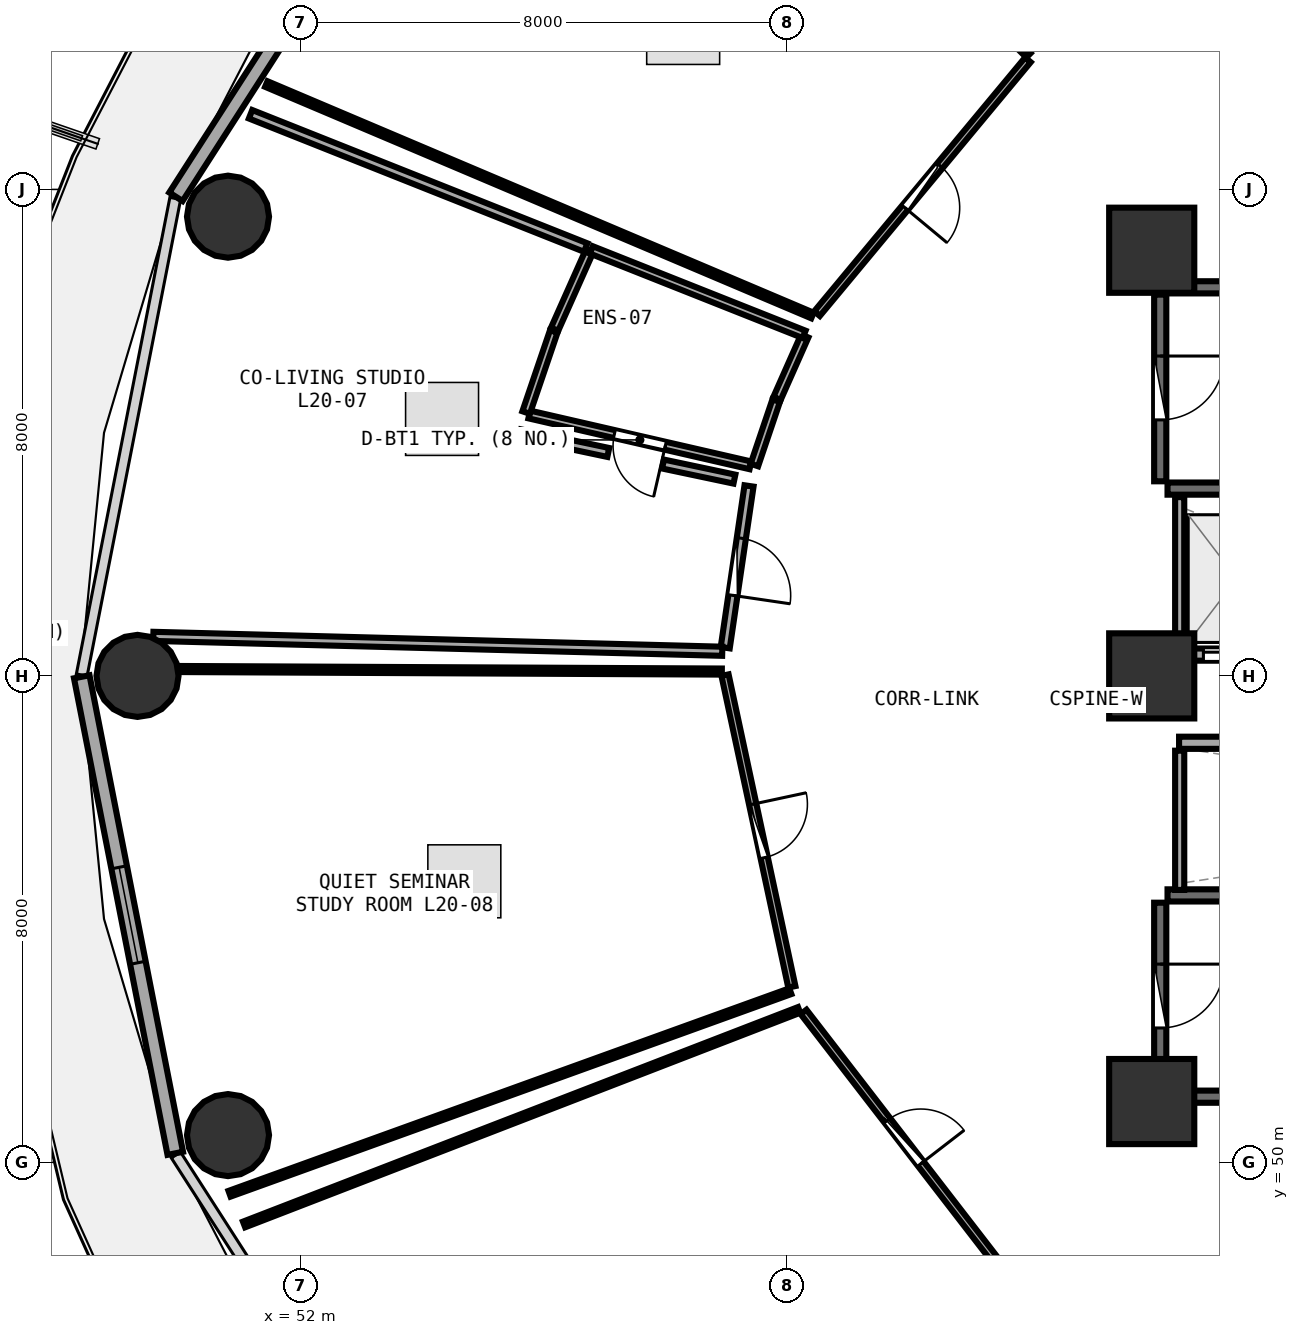
"""IFC4 building model, lengths in metres.
Left out: names, types, materials, properties, quantities, classifications, styles, units other than length and angle.
Written with IfcOpenShell. Run it as: python <this file> out.ifc"""

import sys

from ifc_helpers import new_model, si_unit, direction, frame, frame_2d, origin, origin_2d, place, context, subcontext, project, spatial, rectangle, circle, extrude, element, fill, save


model = new_model("IFC4")
c1 = context("Model", 3, precision=1e-05, world=origin(), true_north=direction((0.0, 1.0)))
c2 = subcontext(c1, "Body", "Model", "MODEL_VIEW")
j1 = project(units=[si_unit("LENGTHUNIT", "METRE"), si_unit("PLANEANGLEUNIT", "RADIAN")], contexts=[c1])
p1 = place(None, origin())
s1 = spatial("IfcSite", under=j1, at=p1, CompositionType="ELEMENT")
p2 = place(p1, origin())
s2 = spatial("IfcBuilding", under=s1, at=p2, CompositionType="ELEMENT")
p3 = place(p2, frame((0.0, 0.0, 80.1)))
s3 = spatial("IfcBuildingStorey", under=s2, at=p3, CompositionType="ELEMENT", Elevation=80.1)
for number, where, z_axis, x_axis in (
    (1, (66.0, 51.0, 0.0), (0.0, 0.0, 1.0), (1.0, 0.0, 0.0)),
    (2, (66.0, 65.0, 0.0), (0.0, 0.0, 1.0), (1.0, 0.0, 0.0)),
    (3, (66.0, 58.0, 0.0), (0.0, 0.0, 1.0), (1.0, 0.0, 0.0)),
):
    element("IfcColumn", number, at=place(p3, frame(where, z_axis=z_axis, x_axis=x_axis)), inside=s3, PredefinedType="PILASTER", context=c2, shape_type="SweptSolid", body=[
        extrude(rectangle(XDim=1.4, YDim=1.4, at=origin_2d()), origin(), (0.0, 0.0, 1.0), 3.75),
    ])
for number, where, z_axis, x_axis in (
    (4, (50.808, 65.552, 0.0), (0.0, 0.0, 1.0), (1.0, 0.0, 0.0)),
    (5, (49.32, 58.0, 0.0), (0.0, 0.0, 1.0), (1.0, 0.0, 0.0)),
    (6, (50.808, 50.448, 0.0), (0.0, 0.0, 1.0), (1.0, 0.0, 0.0)),
):
    element("IfcColumn", number, at=place(p3, frame(where, z_axis=z_axis, x_axis=x_axis)), inside=s3, PredefinedType="COLUMN", context=c2, shape_type="SweptSolid", body=[
        extrude(circle(Radius=0.675, at=origin_2d()), origin(), (0.0, 0.0, 1.0), 3.75),
    ])
p4 = place(p3, frame((54.381, 72.771, 0.0), z_axis=(0.0, 0.0, 1.0), x_axis=(-0.540620528459, -0.841266571432, 0.0)))
e7 = element("IfcWall", 7, at=p4, inside=s3, PredefinedType="SOLIDWALL", context=c2, shape_type="SweptSolid", body=[
    extrude(rectangle(XDim=8.193, YDim=0.26, at=frame_2d((4.096, 0.0))), origin(), (0.0, 0.0, 1.0), 3.475),
])
p5 = place(p4, frame((3.621, 0.0, 0.0)))
e8 = element("IfcOpeningElement", 8, at=p5, cuts=e7, PredefinedType="OPENING", context=c2, shape_type="SweptSolid", body=[
    extrude(rectangle(XDim=0.95, YDim=2.1, at=frame_2d((0.475, 1.05))), frame((0.0, 0.14, 0.0), z_axis=(0.0, -1.0, 0.0), x_axis=(1.0, 0.0, 0.0)), (0.0, 0.0, 1.0), 0.28),
])
p6 = place(p4, frame((2.041, 0.0, 0.85)))
e9 = element("IfcOpeningElement", 9, at=p6, cuts=e7, PredefinedType="OPENING", context=c2, shape_type="SweptSolid", body=[
    extrude(rectangle(XDim=1.2, YDim=1.45, at=frame_2d((0.6, 0.725))), frame((0.0, 0.14, 0.0), z_axis=(0.0, -1.0, 0.0), x_axis=(1.0, 0.0, 0.0)), (0.0, 0.0, 1.0), 0.28),
])
p7 = place(p3, frame((48.403, 57.985, 0.0), z_axis=(0.0, 0.0, 1.0), x_axis=(0.192581843632, -0.981280914674, 0.0)))
e10 = element("IfcWall", 10, at=p7, inside=s3, PredefinedType="SOLIDWALL", context=c2, shape_type="SweptSolid", body=[
    extrude(rectangle(XDim=7.987, YDim=0.26, at=frame_2d((3.993, 0.0))), origin(), (0.0, 0.0, 1.0), 3.475),
])
p8 = place(p7, frame((3.193, 0.0, 0.85)))
e11 = element("IfcOpeningElement", 11, at=p8, cuts=e10, PredefinedType="OPENING", context=c2, shape_type="SweptSolid", body=[
    extrude(rectangle(XDim=1.6, YDim=1.45, at=frame_2d((0.8, 0.725))), frame((0.0, 0.14, 0.0), z_axis=(0.0, -1.0, 0.0), x_axis=(1.0, 0.0, 0.0)), (0.0, 0.0, 1.0), 0.28),
])
for number, where, z_axis, x_axis in (
    (12, (66.26, 61.08, 0.0), (0.0, 0.0, 1.0), (1.0, 0.0, 0.0)),
    (13, (73.42, 64.39, 0.0), (0.0, 0.0, 1.0), (-1.0, 0.0, 0.0)),
):
    element("IfcWall", number, at=place(p3, frame(where, z_axis=z_axis, x_axis=x_axis)), inside=s3, PredefinedType="SHEAR", context=c2, shape_type="SweptSolid", body=[
        extrude(rectangle(XDim=7.16, YDim=0.2, at=frame_2d((3.58, 0.0))), origin(), (0.0, 0.0, 1.0), 3.49),
    ])
p9 = place(p3, frame((66.14, 64.27, 0.0), z_axis=(0.0, 0.0, 1.0), x_axis=(0.0, -1.0, 0.0)))
e14 = element("IfcWall", 14, at=p9, inside=s3, PredefinedType="SHEAR", context=c2, shape_type="SweptSolid", body=[
    extrude(rectangle(XDim=3.07, YDim=0.2, at=frame_2d((1.535, 0.0))), origin(), (0.0, 0.0, 1.0), 3.49),
])
p10 = place(p9, frame((1.01, 0.0, 0.0)))
e15 = element("IfcOpeningElement", 15, at=p10, cuts=e14, PredefinedType="OPENING", context=c2, shape_type="SweptSolid", body=[
    extrude(rectangle(XDim=1.05, YDim=2.1, at=frame_2d((0.525, 1.05))), frame((0.0, 0.11, 0.0), z_axis=(0.0, -1.0, 0.0), x_axis=(1.0, 0.0, 0.0)), (0.0, 0.0, 1.0), 0.22),
])
for number, where, z_axis, x_axis in (
    (16, (66.26, 51.08, 0.0), (0.0, 0.0, 1.0), (1.0, 0.0, 0.0)),
    (17, (73.42, 54.39, 0.0), (0.0, 0.0, 1.0), (-1.0, 0.0, 0.0)),
):
    element("IfcWall", number, at=place(p3, frame(where, z_axis=z_axis, x_axis=x_axis)), inside=s3, PredefinedType="SHEAR", context=c2, shape_type="SweptSolid", body=[
        extrude(rectangle(XDim=7.16, YDim=0.2, at=frame_2d((3.58, 0.0))), origin(), (0.0, 0.0, 1.0), 3.49),
    ])
p11 = place(p3, frame((66.14, 54.27, 0.0), z_axis=(0.0, 0.0, 1.0), x_axis=(0.0, -1.0, 0.0)))
e18 = element("IfcWall", 18, at=p11, inside=s3, PredefinedType="SHEAR", context=c2, shape_type="SweptSolid", body=[
    extrude(rectangle(XDim=3.07, YDim=0.2, at=frame_2d((1.535, 0.0))), origin(), (0.0, 0.0, 1.0), 3.49),
])
p12 = place(p11, frame((1.01, 0.0, 0.0)))
e19 = element("IfcOpeningElement", 19, at=p12, cuts=e18, PredefinedType="OPENING", context=c2, shape_type="SweptSolid", body=[
    extrude(rectangle(XDim=1.05, YDim=2.1, at=frame_2d((0.525, 1.05))), frame((0.0, 0.11, 0.0), z_axis=(0.0, -1.0, 0.0), x_axis=(1.0, 0.0, 0.0)), (0.0, 0.0, 1.0), 0.22),
])
p13 = place(p3, frame((66.45, 58.35, 0.0), z_axis=(0.0, 0.0, 1.0), x_axis=(1.0, 0.0, 0.0)))
e20 = element("IfcWall", 20, at=p13, inside=s3, PredefinedType="SOLIDWALL", context=c2, shape_type="SweptSolid", body=[
    extrude(rectangle(XDim=6.0, YDim=0.2, at=frame_2d((3.0, 0.0))), origin(), (0.0, 0.0, 1.0), 3.48),
])
p14 = place(p13, frame((0.4, 0.0, 0.0)))
e21 = element("IfcOpeningElement", 21, at=p14, cuts=e20, PredefinedType="OPENING", context=c2, shape_type="SweptSolid", body=[
    extrude(rectangle(XDim=1.1, YDim=2.1, at=frame_2d((0.55, 1.05))), frame((0.0, 0.11, 0.0), z_axis=(0.0, -1.0, 0.0), x_axis=(1.0, 0.0, 0.0)), (0.0, 0.0, 1.0), 0.22),
])
p15 = place(p13, frame((2.4, 0.0, 0.0)))
e22 = element("IfcOpeningElement", 22, at=p15, cuts=e20, PredefinedType="OPENING", context=c2, shape_type="SweptSolid", body=[
    extrude(rectangle(XDim=1.1, YDim=2.1, at=frame_2d((0.55, 1.05))), frame((0.0, 0.11, 0.0), z_axis=(0.0, -1.0, 0.0), x_axis=(1.0, 0.0, 0.0)), (0.0, 0.0, 1.0), 0.22),
])
p16 = place(p13, frame((4.4, 0.0, 0.0)))
e23 = element("IfcOpeningElement", 23, at=p16, cuts=e20, PredefinedType="OPENING", context=c2, shape_type="SweptSolid", body=[
    extrude(rectangle(XDim=1.1, YDim=2.1, at=frame_2d((0.55, 1.05))), frame((0.0, 0.11, 0.0), z_axis=(0.0, -1.0, 0.0), x_axis=(1.0, 0.0, 0.0)), (0.0, 0.0, 1.0), 0.22),
])
p17 = place(p3, frame((66.46, 58.48, 0.0), z_axis=(0.0, 0.0, 1.0), x_axis=(0.0, 1.0, 0.0)))
e24 = element("IfcWall", 24, at=p17, inside=s3, PredefinedType="PARTITIONING", context=c2, shape_type="SweptSolid", body=[
    extrude(rectangle(XDim=2.46, YDim=0.15, at=frame_2d((1.23, 0.0))), origin(), (0.0, 0.0, 1.0), 3.48),
])
p18 = place(p3, frame((66.45, 56.9, 0.0), z_axis=(0.0, 0.0, 1.0), x_axis=(1.0, 0.0, 0.0)))
e25 = element("IfcWall", 25, at=p18, inside=s3, PredefinedType="SOLIDWALL", context=c2, shape_type="SweptSolid", body=[
    extrude(rectangle(XDim=14.4, YDim=0.2, at=frame_2d((7.2, 0.0))), origin(), (0.0, 0.0, 1.0), 3.48),
])
p19 = place(p3, frame((66.46, 54.48, 0.0), z_axis=(0.0, 0.0, 1.0), x_axis=(0.0, 1.0, 0.0)))
e26 = element("IfcWall", 26, at=p19, inside=s3, PredefinedType="PARTITIONING", context=c2, shape_type="SweptSolid", body=[
    extrude(rectangle(XDim=2.29, YDim=0.15, at=frame_2d((1.145, 0.0))), origin(), (0.0, 0.0, 1.0), 3.48),
])
p20 = place(p3, frame((63.964, 68.131, 0.0), z_axis=(0.0, 0.0, 1.0), x_axis=(-0.639104047727, -0.769120287198, 0.0)))
e27 = element("IfcWall", 27, at=p20, inside=s3, PredefinedType="PARTITIONING", context=c2, shape_type="SweptSolid", body=[
    extrude(rectangle(XDim=5.427, YDim=0.12, at=frame_2d((2.713, 0.0))), origin(), (0.0, 0.0, 1.0), 2.925),
])
p21 = place(p20, frame((2.263, 0.0, 0.0)))
e28 = element("IfcOpeningElement", 28, at=p21, cuts=e27, PredefinedType="OPENING", context=c2, shape_type="SweptSolid", body=[
    extrude(rectangle(XDim=0.9, YDim=2.08, at=frame_2d((0.45, 1.04))), frame((0.0, 0.07, 0.0), z_axis=(0.0, -1.0, 0.0), x_axis=(1.0, 0.0, 0.0)), (0.0, 0.0, 1.0), 0.14),
])
p22 = place(p3, frame((59.4, 61.462, 0.0), z_axis=(0.0, 0.0, 1.0), x_axis=(-0.974573904169, 0.224066296689, 0.0)))
e29 = element("IfcWall", 29, at=p22, inside=s3, PredefinedType="PLUMBINGWALL", context=c2, shape_type="SweptSolid", body=[
    extrude(rectangle(XDim=3.732, YDim=0.13, at=frame_2d((1.866, 0.0))), origin(), (0.0, 0.0, 1.0), 3.175),
])
p23 = place(p22, frame((1.436, 0.0, 0.0)))
e30 = element("IfcOpeningElement", 30, at=p23, cuts=e29, PredefinedType="OPENING", context=c2, shape_type="SweptSolid", body=[
    extrude(rectangle(XDim=0.86, YDim=2.05, at=frame_2d((0.43, 1.025))), frame((0.0, 0.075, 0.0), z_axis=(0.0, -1.0, 0.0), x_axis=(1.0, 0.0, 0.0)), (0.0, 0.0, 1.0), 0.15),
])
p24 = place(p3, frame((59.377, 61.124, 0.0), z_axis=(0.0, 0.0, 1.0), x_axis=(-0.145640373191, -0.989337597434, 0.0)))
e31 = element("IfcWall", 31, at=p24, inside=s3, PredefinedType="PARTITIONING", context=c2, shape_type="SweptSolid", body=[
    extrude(rectangle(XDim=2.689, YDim=0.15, at=frame_2d((1.344, 0.0))), origin(), (0.0, 0.0, 1.0), 3.48),
])
p25 = place(p24, frame((0.869, 0.0, 0.0)))
e32 = element("IfcOpeningElement", 32, at=p25, cuts=e31, PredefinedType="OPENING", context=c2, shape_type="SweptSolid", body=[
    extrude(rectangle(XDim=0.95, YDim=2.08, at=frame_2d((0.475, 1.04))), frame((0.0, 0.085, 0.0), z_axis=(0.0, -1.0, 0.0), x_axis=(1.0, 0.0, 0.0)), (0.0, 0.0, 1.0), 0.17),
])
p26 = place(p3, frame((58.983, 58.012, 0.0), z_axis=(0.0, 0.0, 1.0), x_axis=(0.209586341226, -0.977790143933, 0.0)))
e33 = element("IfcWall", 33, at=p26, inside=s3, PredefinedType="PARTITIONING", context=c2, shape_type="SweptSolid", body=[
    extrude(rectangle(XDim=5.242, YDim=0.12, at=frame_2d((2.621, 0.0))), origin(), (0.0, 0.0, 1.0), 2.925),
])
p27 = place(p26, frame((2.171, 0.0, 0.0)))
e34 = element("IfcOpeningElement", 34, at=p27, cuts=e33, PredefinedType="OPENING", context=c2, shape_type="SweptSolid", body=[
    extrude(rectangle(XDim=0.9, YDim=2.08, at=frame_2d((0.45, 1.04))), frame((0.0, 0.07, 0.0), z_axis=(0.0, -1.0, 0.0), x_axis=(1.0, 0.0, 0.0)), (0.0, 0.0, 1.0), 0.14),
])
p28 = place(p3, frame((60.275, 52.473, 0.0), z_axis=(0.0, 0.0, 1.0), x_axis=(0.611167326409, -0.791501420801, 0.0)))
e35 = element("IfcWall", 35, at=p28, inside=s3, PredefinedType="PARTITIONING", context=c2, shape_type="SweptSolid", body=[
    extrude(rectangle(XDim=5.407, YDim=0.12, at=frame_2d((2.704, 0.0))), origin(), (0.0, 0.0, 1.0), 2.925),
])
p29 = place(p28, frame((2.254, 0.0, 0.0)))
e36 = element("IfcOpeningElement", 36, at=p29, cuts=e35, PredefinedType="OPENING", context=c2, shape_type="SweptSolid", body=[
    extrude(rectangle(XDim=0.9, YDim=2.08, at=frame_2d((0.45, 1.04))), frame((0.0, 0.07, 0.0), z_axis=(0.0, -1.0, 0.0), x_axis=(1.0, 0.0, 0.0)), (0.0, 0.0, 1.0), 0.14),
])
p30 = place(p3, frame((60.42, 63.927, 0.0), z_axis=(0.0, 0.0, 1.0), x_axis=(-0.920723225206, 0.390216276654, 0.0)))
e37 = element("IfcWall", 37, at=p30, inside=s3, PredefinedType="PARTITIONING", context=c2, shape_type="SweptSolid", body=[
    extrude(rectangle(XDim=9.756, YDim=0.1, at=frame_2d((4.878, 0.0))), origin(), (0.0, 0.0, 1.0), 2.925),
])
p31 = place(p3, frame((57.344, 74.756, 0.0), z_axis=(0.0, 0.0, 1.0), x_axis=(0.711285789258, -0.702902927864, 0.0)))
e38 = element("IfcWall", 38, at=p31, inside=s3, PredefinedType="PARTITIONING", context=c2, shape_type="SweptSolid", body=[
    extrude(rectangle(XDim=9.32, YDim=0.1, at=frame_2d((4.66, 0.0))), origin(), (0.0, 0.0, 1.0), 2.975),
])
p32 = place(p3, frame((60.294, 63.591, 0.0), z_axis=(0.0, 0.0, 1.0), x_axis=(-0.40547338745, -0.914106849372, 0.0)))
e39 = element("IfcWall", 39, at=p32, inside=s3, PredefinedType="PLUMBINGWALL", context=c2, shape_type="SweptSolid", body=[
    extrude(rectangle(XDim=1.124, YDim=0.13, at=frame_2d((0.562, 0.0))), origin(), (0.0, 0.0, 1.0), 3.235),
])
p33 = place(p3, frame((59.823, 62.526, 0.0), z_axis=(0.0, 0.0, 1.0), x_axis=(-0.320617291593, -0.947208821925, 0.0)))
e40 = element("IfcWall", 40, at=p33, inside=s3, PredefinedType="PLUMBINGWALL", context=c2, shape_type="SweptSolid", body=[
    extrude(rectangle(XDim=1.117, YDim=0.13, at=frame_2d((0.559, 0.0))), origin(), (0.0, 0.0, 1.0), 3.48),
])
p34 = place(p3, frame((55.711, 62.331, 0.0), z_axis=(0.0, 0.0, 1.0), x_axis=(0.322409215332, 0.946600389747, 0.0)))
e41 = element("IfcWall", 41, at=p34, inside=s3, PredefinedType="PLUMBINGWALL", context=c2, shape_type="SweptSolid", body=[
    extrude(rectangle(XDim=1.408, YDim=0.13, at=frame_2d((0.704, 0.0))), origin(), (0.0, 0.0, 1.0), 3.48),
])
p35 = place(p3, frame((56.18, 63.701, 0.0), z_axis=(0.0, 0.0, 1.0), x_axis=(0.407258007738, 0.913313152831, 0.0)))
e42 = element("IfcWall", 42, at=p35, inside=s3, PredefinedType="PLUMBINGWALL", context=c2, shape_type="SweptSolid", body=[
    extrude(rectangle(XDim=1.416, YDim=0.13, at=frame_2d((0.708, 0.0))), origin(), (0.0, 0.0, 1.0), 3.175),
])
p36 = place(p3, frame((56.784, 65.006, 0.0), z_axis=(0.0, 0.0, 1.0), x_axis=(0.929457187308, -0.368929989242, 0.0)))
e43 = element("IfcWall", 43, at=p36, inside=s3, PredefinedType="PLUMBINGWALL", context=c2, shape_type="SweptSolid", body=[
    extrude(rectangle(XDim=3.765, YDim=0.13, at=frame_2d((1.883, 0.0))), origin(), (0.0, 0.0, 1.0), 3.175),
])
p37 = place(p3, frame((58.937, 58.405, 0.0), z_axis=(0.0, 0.0, 1.0), x_axis=(-0.99965775334, 0.026160584617, 0.0)))
e44 = element("IfcWall", 44, at=p37, inside=s3, PredefinedType="PARTITIONING", context=c2, shape_type="SweptSolid", body=[
    extrude(rectangle(XDim=9.36, YDim=0.15, at=frame_2d((4.68, 0.0))), origin(), (0.0, 0.0, 1.0), 2.975),
])
p38 = place(p3, frame((51.179, 67.236, 0.0), z_axis=(0.0, 0.0, 1.0), x_axis=(0.929212756669, -0.369545197294, 0.0)))
e45 = element("IfcWall", 45, at=p38, inside=s3, PredefinedType="PARTITIONING", context=c2, shape_type="SweptSolid", body=[
    extrude(rectangle(XDim=5.933, YDim=0.15, at=frame_2d((2.966, 0.0))), origin(), (0.0, 0.0, 1.0), 2.925),
])
p39 = place(p3, frame((55.613, 61.981, 0.0), z_axis=(0.0, 0.0, 1.0), x_axis=(0.978379851426, -0.206816020472, 0.0)))
e46 = element("IfcWall", 46, at=p39, inside=s3, PredefinedType="PARTITIONING", context=c2, shape_type="SweptSolid", body=[
    extrude(rectangle(XDim=1.481, YDim=0.15, at=frame_2d((0.741, 0.0))), origin(), (0.0, 0.0, 1.0), 3.175),
])
p40 = place(p3, frame((57.963, 61.484, 0.0), z_axis=(0.0, 0.0, 1.0), x_axis=(0.978361584069, -0.20690241859, 0.0)))
e47 = element("IfcWall", 47, at=p40, inside=s3, PredefinedType="PARTITIONING", context=c2, shape_type="SweptSolid", body=[
    extrude(rectangle(XDim=1.2, YDim=0.15, at=frame_2d((0.6, 0.0))), origin(), (0.0, 0.0, 1.0), 3.48),
])
p41 = place(p3, frame((60.056, 52.814, 0.0), z_axis=(0.0, 0.0, 1.0), x_axis=(-0.940543515483, -0.339673218671, 0.0)))
e48 = element("IfcWall", 48, at=p41, inside=s3, PredefinedType="PARTITIONING", context=c2, shape_type="SweptSolid", body=[
    extrude(rectangle(XDim=9.806, YDim=0.1, at=frame_2d((4.903, 0.0))), origin(), (0.0, 0.0, 1.0), 2.925),
])
p42 = place(p3, frame((50.011, 58.113, 0.0), z_axis=(0.0, 0.0, 1.0), x_axis=(0.999989173449, -0.004653276749, 0.0)))
e49 = element("IfcWall", 49, at=p42, inside=s3, PredefinedType="PARTITIONING", context=c2, shape_type="SweptSolid", body=[
    extrude(rectangle(XDim=8.919, YDim=0.1, at=frame_2d((4.459, 0.0))), origin(), (0.0, 0.0, 1.0), 2.925),
])
p43 = place(p3, frame((51.072, 48.979, 0.0), z_axis=(0.0, 0.0, 1.0), x_axis=(0.932757339165, 0.360504849112, 0.0)))
e50 = element("IfcWall", 50, at=p43, inside=s3, PredefinedType="PARTITIONING", context=c2, shape_type="SweptSolid", body=[
    extrude(rectangle(XDim=9.786, YDim=0.1, at=frame_2d((4.893, 0.0))), origin(), (0.0, 0.0, 1.0), 2.925),
])
p44 = place(p8, origin())
e51 = element("IfcWindow", 51, at=p44, inside=s3, PartitioningType="SINGLE_PANEL", PredefinedType="WINDOW", context=c2, shape_type="SweptSolid", body=[
    extrude(rectangle(XDim=1.6, YDim=1.45, at=frame_2d((0.8, 0.725))), frame((0.0, 0.03, 0.0), z_axis=(0.0, -1.0, 0.0), x_axis=(1.0, 0.0, 0.0)), (0.0, 0.0, 1.0), 0.06),
])
fill(e11, e51)
p45 = place(p10, origin())
e52 = element("IfcDoor", 52, at=p45, inside=s3, OperationType="SINGLE_SWING_LEFT", PredefinedType="DOOR", context=c2, shape_type="SweptSolid", body=[
    extrude(rectangle(XDim=1.05, YDim=2.1, at=frame_2d((0.525, 1.05))), frame((0.0, 0.025, 0.0), z_axis=(0.0, -1.0, 0.0), x_axis=(1.0, 0.0, 0.0)), (0.0, 0.0, 1.0), 0.05),
])
fill(e15, e52)
p46 = place(p12, origin())
e53 = element("IfcDoor", 53, at=p46, inside=s3, OperationType="SINGLE_SWING_LEFT", PredefinedType="DOOR", context=c2, shape_type="SweptSolid", body=[
    extrude(rectangle(XDim=1.05, YDim=2.1, at=frame_2d((0.525, 1.05))), frame((0.0, 0.025, 0.0), z_axis=(0.0, -1.0, 0.0), x_axis=(1.0, 0.0, 0.0)), (0.0, 0.0, 1.0), 0.05),
])
fill(e19, e53)
p47 = place(p14, origin())
e54 = element("IfcDoor", 54, at=p47, inside=s3, OperationType="DOUBLE_DOOR_SLIDING", PredefinedType="DOOR", context=c2, shape_type="SweptSolid", body=[
    extrude(rectangle(XDim=1.1, YDim=2.1, at=frame_2d((0.55, 1.05))), frame((0.0, 0.025, 0.0), z_axis=(0.0, -1.0, 0.0), x_axis=(1.0, 0.0, 0.0)), (0.0, 0.0, 1.0), 0.05),
])
fill(e21, e54)
p48 = place(p21, origin())
e55 = element("IfcDoor", 55, at=p48, inside=s3, OperationType="SINGLE_SWING_RIGHT", PredefinedType="DOOR", context=c2, shape_type="SweptSolid", body=[
    extrude(rectangle(XDim=0.9, YDim=2.08, at=frame_2d((0.45, 1.04))), frame((0.0, 0.025, 0.0), z_axis=(0.0, -1.0, 0.0), x_axis=(1.0, 0.0, 0.0)), (0.0, 0.0, 1.0), 0.05),
])
fill(e28, e55)
p49 = place(p23, origin())
e56 = element("IfcDoor", 56, at=p49, inside=s3, OperationType="SINGLE_SWING_LEFT", PredefinedType="DOOR", context=c2, shape_type="SweptSolid", body=[
    extrude(rectangle(XDim=0.86, YDim=2.05, at=frame_2d((0.43, 1.025))), frame((0.0, 0.025, 0.0), z_axis=(0.0, -1.0, 0.0), x_axis=(1.0, 0.0, 0.0)), (0.0, 0.0, 1.0), 0.05),
])
fill(e30, e56)
p50 = place(p25, origin())
e57 = element("IfcDoor", 57, at=p50, inside=s3, OperationType="SINGLE_SWING_RIGHT", PredefinedType="DOOR", context=c2, shape_type="SweptSolid", body=[
    extrude(rectangle(XDim=0.95, YDim=2.08, at=frame_2d((0.475, 1.04))), frame((0.0, 0.025, 0.0), z_axis=(0.0, -1.0, 0.0), x_axis=(1.0, 0.0, 0.0)), (0.0, 0.0, 1.0), 0.05),
])
fill(e32, e57)
p51 = place(p27, origin())
e58 = element("IfcDoor", 58, at=p51, inside=s3, OperationType="SINGLE_SWING_LEFT", PredefinedType="DOOR", context=c2, shape_type="SweptSolid", body=[
    extrude(rectangle(XDim=0.9, YDim=2.08, at=frame_2d((0.45, 1.04))), frame((0.0, 0.025, 0.0), z_axis=(0.0, -1.0, 0.0), x_axis=(1.0, 0.0, 0.0)), (0.0, 0.0, 1.0), 0.05),
])
fill(e34, e58)
p52 = place(p29, origin())
e59 = element("IfcDoor", 59, at=p52, inside=s3, OperationType="SINGLE_SWING_RIGHT", PredefinedType="DOOR", context=c2, shape_type="SweptSolid", body=[
    extrude(rectangle(XDim=0.9, YDim=2.08, at=frame_2d((0.45, 1.04))), frame((0.0, 0.025, 0.0), z_axis=(0.0, -1.0, 0.0), x_axis=(1.0, 0.0, 0.0)), (0.0, 0.0, 1.0), 0.05),
])
fill(e36, e59)
save(model, sys.argv[1])
